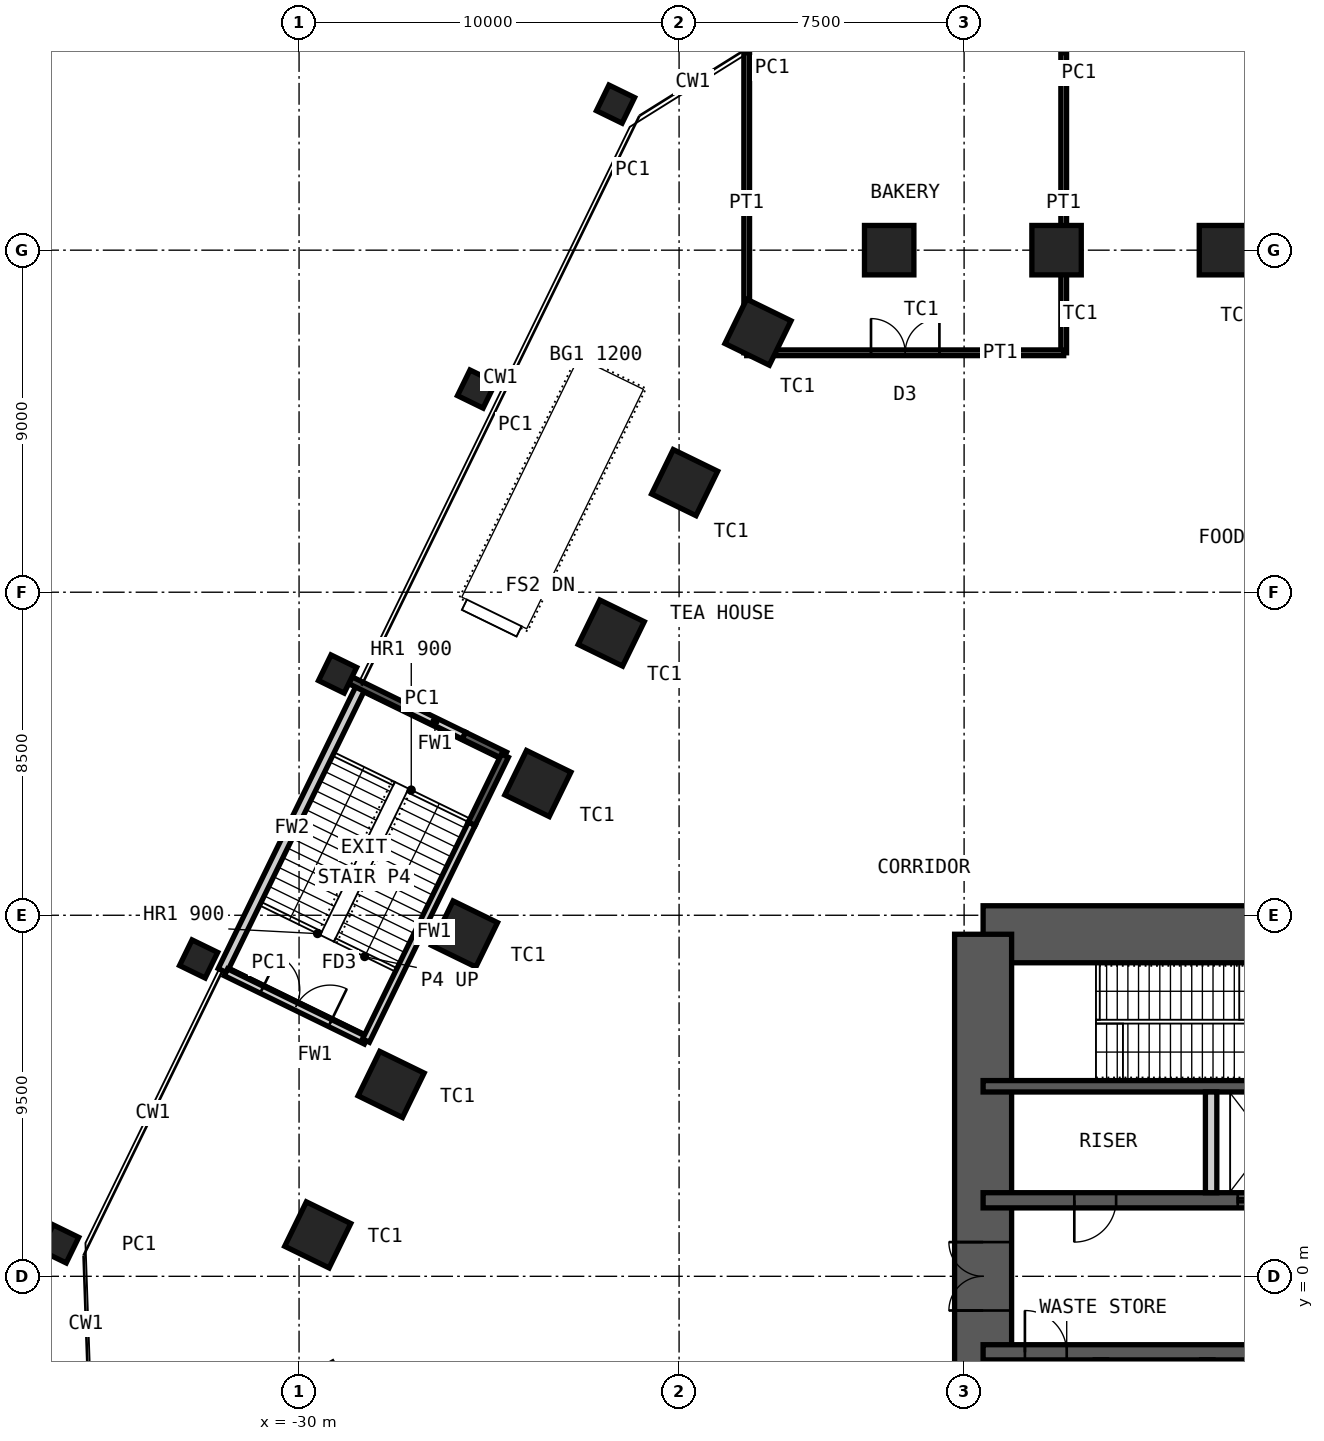
"""IFC4 building model, lengths in metres.
Left out: names, types, materials, properties, quantities, classifications, styles, units other than length and angle.
Written with IfcOpenShell. Run it as: python <this file> out.ifc"""

import sys

from ifc_helpers import new_model, si_unit, direction, frame, frame_2d, origin, origin_2d, place, context, subcontext, project, spatial, rectangle, hollow_rectangle, extrude, element, fill, save


model = new_model("IFC4")
c1 = context("Model", 3, precision=1e-05, world=origin(), true_north=direction((0.0, 1.0)))
c2 = subcontext(c1, "Body", "Model", "MODEL_VIEW")
j1 = project(units=[si_unit("LENGTHUNIT", "METRE"), si_unit("PLANEANGLEUNIT", "RADIAN")], contexts=[c1])
p1 = place(None, origin())
s1 = spatial("IfcSite", under=j1, at=p1, CompositionType="ELEMENT")
p2 = place(p1, origin())
s2 = spatial("IfcBuilding", under=s1, at=p2, CompositionType="ELEMENT")
p3 = place(p2, frame((0.0, 0.0, 6.0)))
s3 = spatial("IfcBuildingStorey", under=s2, at=p3, CompositionType="ELEMENT", Elevation=6.0)
for number, where, z_axis, x_axis in (
    (1, (-14.471, 27.0, 0.0), (0.0, 0.0, 1.0), (-1.0, 0.0, 0.0)),
    (2, (-10.067, 27.0, 0.0), (0.0, 0.0, 1.0), (-1.0, 0.0, 0.0)),
    (3, (-5.662, 27.0, 0.0), (0.0, 0.0, 1.0), (-1.0, 0.0, 0.0)),
    (4, (-29.509, 1.09, 0.0), (0.0, 0.0, 1.0), (-0.438, -0.899, 0.0)),
    (5, (-27.578, 5.049, 0.0), (0.0, 0.0, 1.0), (-0.438, -0.899, 0.0)),
    (6, (-25.647, 9.008, 0.0), (0.0, 0.0, 1.0), (-0.438, -0.899, 0.0)),
    (7, (-23.716, 12.966, 0.0), (0.0, 0.0, 1.0), (-0.438, -0.899, 0.0)),
    (8, (-21.785, 16.925, 0.0), (0.0, 0.0, 1.0), (-0.438, -0.899, 0.0)),
    (9, (-19.854, 20.884, 0.0), (0.0, 0.0, 1.0), (-0.438, -0.899, 0.0)),
    (10, (-17.924, 24.843, 0.0), (0.0, 0.0, 1.0), (-0.438, -0.899, 0.0)),
):
    element("IfcColumn", number, at=place(p3, frame(where, z_axis=z_axis, x_axis=x_axis)), inside=s3, PredefinedType="COLUMN", context=c2, shape_type="SweptSolid", body=[
        extrude(hollow_rectangle(XDim=1.3, YDim=1.3, WallThickness=0.1, at=origin_2d()), origin(), (0.0, 0.0, 1.0), 6.0),
    ])
for number, where, z_axis, x_axis in (
    (11, (-36.3, 0.853, 0.0), (0.0, 0.0, 1.0), (-0.438, -0.899, 0.0)),
    (12, (-32.643, 8.35, 0.0), (0.0, 0.0, 1.0), (-0.438, -0.899, 0.0)),
    (13, (-28.986, 15.848, 0.0), (0.0, 0.0, 1.0), (-0.438, -0.899, 0.0)),
    (14, (-25.33, 23.345, 0.0), (0.0, 0.0, 1.0), (-0.438, -0.899, 0.0)),
    (15, (-21.673, 30.843, 0.0), (0.0, 0.0, 1.0), (-0.438, -0.899, 0.0)),
):
    element("IfcColumn", number, at=place(p3, frame(where, z_axis=z_axis, x_axis=x_axis)), inside=s3, PredefinedType="COLUMN", context=c2, shape_type="SweptSolid", body=[
        extrude(hollow_rectangle(XDim=0.75, YDim=0.75, WallThickness=0.036, at=origin_2d()), origin(), (0.0, 0.0, 1.0), 6.0),
    ])
p4 = place(p3, frame((-12.0, 9.0, 0.0), z_axis=(0.0, 0.0, 1.0), x_axis=(1.0, 0.0, 0.0)))
e16 = element("IfcWall", 16, at=p4, inside=s3, PredefinedType="SHEAR", context=c2, shape_type="SweptSolid", body=[
    extrude(rectangle(XDim=24.0, YDim=1.5, at=frame_2d((12.0, 0.0))), origin(), (0.0, 0.0, 1.0), 6.0),
])
p5 = place(p4, frame((10.4, 0.0, 0.0)))
e17 = element("IfcOpeningElement", 17, at=p5, cuts=e16, PredefinedType="OPENING", context=c2, shape_type="SweptSolid", body=[
    extrude(rectangle(XDim=1.0, YDim=2.1, at=frame_2d((0.5, 1.05))), frame((0.0, 0.76, 0.0), z_axis=(0.0, -1.0, 0.0), x_axis=(1.0, 0.0, 0.0)), (0.0, 0.0, 1.0), 1.52),
])
p6 = place(p4, frame((17.6, 0.0, 0.0)))
e18 = element("IfcOpeningElement", 18, at=p6, cuts=e16, PredefinedType="OPENING", context=c2, shape_type="SweptSolid", body=[
    extrude(rectangle(XDim=0.9, YDim=2.1, at=frame_2d((0.45, 1.05))), frame((0.0, 0.76, 0.0), z_axis=(0.0, -1.0, 0.0), x_axis=(1.0, 0.0, 0.0)), (0.0, 0.0, 1.0), 1.52),
])
p7 = place(p4, frame((21.9, 0.0, 0.0)))
e19 = element("IfcOpeningElement", 19, at=p7, cuts=e16, PredefinedType="OPENING", context=c2, shape_type="SweptSolid", body=[
    extrude(rectangle(XDim=0.9, YDim=2.1, at=frame_2d((0.45, 1.05))), frame((0.0, 0.76, 0.0), z_axis=(0.0, -1.0, 0.0), x_axis=(1.0, 0.0, 0.0)), (0.0, 0.0, 1.0), 1.52),
])
p8 = place(p3, frame((-12.0, -9.0, 0.0), z_axis=(0.0, 0.0, 1.0), x_axis=(0.0, 1.0, 0.0)))
e20 = element("IfcWall", 20, at=p8, inside=s3, PredefinedType="SHEAR", context=c2, shape_type="SweptSolid", body=[
    extrude(rectangle(XDim=18.0, YDim=1.5, at=frame_2d((9.0, 0.0))), origin(), (0.0, 0.0, 1.0), 6.0),
])
p9 = place(p8, frame((8.1, 0.0, 0.0)))
e21 = element("IfcOpeningElement", 21, at=p9, cuts=e20, PredefinedType="OPENING", context=c2, shape_type="SweptSolid", body=[
    extrude(rectangle(XDim=1.8, YDim=2.1, at=frame_2d((0.9, 1.05))), frame((0.0, 0.76, 0.0), z_axis=(0.0, -1.0, 0.0), x_axis=(1.0, 0.0, 0.0)), (0.0, 0.0, 1.0), 1.52),
])
p10 = place(p3, frame((-12.0, 5.0, 0.0), z_axis=(0.0, 0.0, 1.0), x_axis=(1.0, 0.0, 0.0)))
e22 = element("IfcWall", 22, at=p10, inside=s3, PredefinedType="SHEAR", context=c2, shape_type="SweptSolid", body=[
    extrude(rectangle(XDim=24.0, YDim=0.3, at=frame_2d((12.0, 0.0))), origin(), (0.0, 0.0, 1.0), 6.0),
])
p11 = place(p3, frame((-12.0, 2.0, 0.0), z_axis=(0.0, 0.0, 1.0), x_axis=(1.0, 0.0, 0.0)))
e23 = element("IfcWall", 23, at=p11, inside=s3, PredefinedType="SHEAR", context=c2, shape_type="SweptSolid", body=[
    extrude(rectangle(XDim=24.0, YDim=0.4, at=frame_2d((12.0, 0.0))), origin(), (0.0, 0.0, 1.0), 6.0),
])
p12 = place(p11, frame((2.4, 0.0, 0.0)))
e24 = element("IfcOpeningElement", 24, at=p12, cuts=e23, PredefinedType="OPENING", context=c2, shape_type="SweptSolid", body=[
    extrude(rectangle(XDim=1.1, YDim=2.1, at=frame_2d((0.55, 1.05))), frame((0.0, 0.21, 0.0), z_axis=(0.0, -1.0, 0.0), x_axis=(1.0, 0.0, 0.0)), (0.0, 0.0, 1.0), 0.42),
])
p13 = place(p11, frame((22.0, 0.0, 0.0)))
e25 = element("IfcOpeningElement", 25, at=p13, cuts=e23, PredefinedType="OPENING", context=c2, shape_type="SweptSolid", body=[
    extrude(rectangle(XDim=1.1, YDim=2.1, at=frame_2d((0.55, 1.05))), frame((0.0, 0.21, 0.0), z_axis=(0.0, -1.0, 0.0), x_axis=(1.0, 0.0, 0.0)), (0.0, 0.0, 1.0), 0.42),
])
p14 = place(p11, frame((10.15, 0.0, 0.0)))
e26 = element("IfcOpeningElement", 26, at=p14, cuts=e23, PredefinedType="OPENING", context=c2, shape_type="SweptSolid", body=[
    extrude(rectangle(XDim=1.0, YDim=2.1, at=frame_2d((0.5, 1.05))), frame((0.0, 0.21, 0.0), z_axis=(0.0, -1.0, 0.0), x_axis=(1.0, 0.0, 0.0)), (0.0, 0.0, 1.0), 0.42),
])
p15 = place(p11, frame((6.7, 0.0, 0.0)))
e27 = element("IfcOpeningElement", 27, at=p15, cuts=e23, PredefinedType="OPENING", context=c2, shape_type="SweptSolid", body=[
    extrude(rectangle(XDim=1.4, YDim=2.4, at=frame_2d((0.7, 1.2))), frame((0.0, 0.21, 0.0), z_axis=(0.0, -1.0, 0.0), x_axis=(1.0, 0.0, 0.0)), (0.0, 0.0, 1.0), 0.42),
])
p16 = place(p11, frame((13.35, 0.0, 0.0)))
e28 = element("IfcOpeningElement", 28, at=p16, cuts=e23, PredefinedType="OPENING", context=c2, shape_type="SweptSolid", body=[
    extrude(rectangle(XDim=1.1, YDim=2.4, at=frame_2d((0.55, 1.2))), frame((0.0, 0.21, 0.0), z_axis=(0.0, -1.0, 0.0), x_axis=(1.0, 0.0, 0.0)), (0.0, 0.0, 1.0), 0.42),
])
p17 = place(p11, frame((16.15, 0.0, 0.0)))
e29 = element("IfcOpeningElement", 29, at=p17, cuts=e23, PredefinedType="OPENING", context=c2, shape_type="SweptSolid", body=[
    extrude(rectangle(XDim=1.1, YDim=2.4, at=frame_2d((0.55, 1.2))), frame((0.0, 0.21, 0.0), z_axis=(0.0, -1.0, 0.0), x_axis=(1.0, 0.0, 0.0)), (0.0, 0.0, 1.0), 0.42),
])
p18 = place(p11, frame((18.95, 0.0, 0.0)))
e30 = element("IfcOpeningElement", 30, at=p18, cuts=e23, PredefinedType="OPENING", context=c2, shape_type="SweptSolid", body=[
    extrude(rectangle(XDim=1.1, YDim=2.4, at=frame_2d((0.55, 1.2))), frame((0.0, 0.21, 0.0), z_axis=(0.0, -1.0, 0.0), x_axis=(1.0, 0.0, 0.0)), (0.0, 0.0, 1.0), 0.42),
])
p19 = place(p3, frame((-12.0, -2.0, 0.0), z_axis=(0.0, 0.0, 1.0), x_axis=(1.0, 0.0, 0.0)))
e31 = element("IfcWall", 31, at=p19, inside=s3, PredefinedType="SHEAR", context=c2, shape_type="SweptSolid", body=[
    extrude(rectangle(XDim=24.0, YDim=0.4, at=frame_2d((12.0, 0.0))), origin(), (0.0, 0.0, 1.0), 6.0),
])
p20 = place(p19, frame((1.1, 0.0, 0.0)))
e32 = element("IfcOpeningElement", 32, at=p20, cuts=e31, PredefinedType="OPENING", context=c2, shape_type="SweptSolid", body=[
    extrude(rectangle(XDim=1.1, YDim=2.1, at=frame_2d((0.55, 1.05))), frame((0.0, 0.21, 0.0), z_axis=(0.0, -1.0, 0.0), x_axis=(1.0, 0.0, 0.0)), (0.0, 0.0, 1.0), 0.42),
])
p21 = place(p19, frame((13.55, 0.0, 0.0)))
e33 = element("IfcOpeningElement", 33, at=p21, cuts=e31, PredefinedType="OPENING", context=c2, shape_type="SweptSolid", body=[
    extrude(rectangle(XDim=1.1, YDim=2.1, at=frame_2d((0.55, 1.05))), frame((0.0, 0.21, 0.0), z_axis=(0.0, -1.0, 0.0), x_axis=(1.0, 0.0, 0.0)), (0.0, 0.0, 1.0), 0.42),
])
p22 = place(p19, frame((20.7, 0.0, 0.0)))
e34 = element("IfcOpeningElement", 34, at=p22, cuts=e31, PredefinedType="OPENING", context=c2, shape_type="SweptSolid", body=[
    extrude(rectangle(XDim=1.1, YDim=2.1, at=frame_2d((0.55, 1.05))), frame((0.0, 0.21, 0.0), z_axis=(0.0, -1.0, 0.0), x_axis=(1.0, 0.0, 0.0)), (0.0, 0.0, 1.0), 0.42),
])
for number, where, z_axis, x_axis in (
    (35, (-6.0, 2.2, 0.0), (0.0, 0.0, 1.0), (0.0, 1.0, 0.0)),
    (36, (-8.9, -4.85, 0.0), (0.0, 0.0, 1.0), (0.0, 1.0, 0.0)),
    (37, (-6.1, -4.85, 0.0), (0.0, 0.0, 1.0), (0.0, 1.0, 0.0)),
):
    element("IfcWall", number, at=place(p3, frame(where, z_axis=z_axis, x_axis=x_axis)), inside=s3, PredefinedType="PARTITIONING", context=c2, shape_type="SweptSolid", body=[
        extrude(rectangle(XDim=2.65, YDim=0.3, at=frame_2d((1.325, 0.0))), origin(), (0.0, 0.0, 1.0), 5.78),
    ])
p23 = place(p3, frame((-32.014, 8.043, 0.0), z_axis=(0.0, 0.0, 1.0), x_axis=(0.438364815309, 0.898797134341, 0.0)))
e38 = element("IfcWall", 38, at=p23, inside=s3, PredefinedType="SOLIDWALL", context=c2, shape_type="SweptSolid", body=[
    extrude(rectangle(XDim=8.342, YDim=0.25, at=frame_2d((4.171, 0.0))), origin(), (0.0, 0.0, 1.0), 5.75),
])
for number, where, z_axis, x_axis in (
    (39, (-18.221, 32.2, 0.0), (0.0, 0.0, 1.0), (0.0, -1.0, 0.0)),
    (40, (-9.879, 32.2, 0.0), (0.0, 0.0, 1.0), (0.0, -1.0, 0.0)),
):
    element("IfcWall", number, at=place(p3, frame(where, z_axis=z_axis, x_axis=x_axis)), inside=s3, PredefinedType="PARTITIONING", context=c2, shape_type="SweptSolid", body=[
        extrude(rectangle(XDim=7.9, YDim=0.15, at=frame_2d((3.95, 0.0))), origin(), (0.0, 0.0, 1.0), 5.75),
    ])
p24 = place(p3, frame((-18.221, 24.3, 0.0), z_axis=(0.0, 0.0, 1.0), x_axis=(1.0, 0.0, 0.0)))
e41 = element("IfcWall", 41, at=p24, inside=s3, PredefinedType="PARTITIONING", context=c2, shape_type="SweptSolid", body=[
    extrude(rectangle(XDim=8.342, YDim=0.15, at=frame_2d((4.171, 0.0))), origin(), (0.0, 0.0, 1.0), 5.75),
])
p25 = place(p24, frame((3.271, 0.0, 0.0)))
e42 = element("IfcOpeningElement", 42, at=p25, cuts=e41, PredefinedType="OPENING", context=c2, shape_type="SweptSolid", body=[
    extrude(rectangle(XDim=1.8, YDim=2.4, at=frame_2d((0.9, 1.2))), frame((0.0, 0.085, 0.0), z_axis=(0.0, -1.0, 0.0), x_axis=(1.0, 0.0, 0.0)), (0.0, 0.0, 1.0), 0.17),
])
p26 = place(p3, frame((-31.924, 8.0, 0.0), z_axis=(0.0, 0.0, 1.0), x_axis=(0.898790191345, -0.438379050529, 0.0)))
e43 = element("IfcWall", 43, at=p26, inside=s3, PredefinedType="PARTITIONING", context=c2, shape_type="SweptSolid", body=[
    extrude(rectangle(XDim=4.1, YDim=0.2, at=frame_2d((2.05, 0.0))), origin(), (0.0, 0.0, 1.0), 5.75),
])
p27 = place(p26, frame((1.05, 0.0, 0.0)))
e44 = element("IfcOpeningElement", 44, at=p27, cuts=e43, PredefinedType="OPENING", context=c2, shape_type="SweptSolid", body=[
    extrude(rectangle(XDim=2.0, YDim=2.4, at=frame_2d((1.0, 1.2))), frame((0.0, 0.11, 0.0), z_axis=(0.0, -1.0, 0.0), x_axis=(1.0, 0.0, 0.0)), (0.0, 0.0, 1.0), 0.22),
])
p28 = place(p3, frame((-28.649, 15.683, 0.0), z_axis=(0.0, 0.0, 1.0), x_axis=(0.898859390649, -0.438237145667, 0.0)))
e45 = element("IfcWall", 45, at=p28, inside=s3, PredefinedType="PARTITIONING", context=c2, shape_type="SweptSolid", body=[
    extrude(rectangle(XDim=1.625, YDim=0.2, at=frame_2d((0.812, 0.0))), origin(), (0.0, 0.0, 1.0), 5.75),
])
p29 = place(p3, frame((-28.239, 6.202, 0.0), z_axis=(0.0, 0.0, 1.0), x_axis=(0.438364548315, 0.89879726456, 0.0)))
e46 = element("IfcWall", 46, at=p29, inside=s3, PredefinedType="PARTITIONING", context=c2, shape_type="SweptSolid", body=[
    extrude(rectangle(XDim=6.35, YDim=0.2, at=frame_2d((3.175, 0.0))), origin(), (0.0, 0.0, 1.0), 5.75),
])
p30 = place(p3, frame((-27.189, 14.971, 0.0), z_axis=(0.0, 0.0, 1.0), x_axis=(0.898750501486, -0.438460415634, 0.0)))
e47 = element("IfcWall", 47, at=p30, inside=s3, PredefinedType="PARTITIONING", context=c2, shape_type="SweptSolid", body=[
    extrude(rectangle(XDim=1.7, YDim=0.2, at=frame_2d((0.85, 0.0))), origin(), (0.0, 0.0, 1.0), 5.75),
])
p31 = place(p3, frame((-25.661, 14.226, 0.0), z_axis=(0.0, 0.0, 1.0), x_axis=(0.898778221275, -0.43840359141, 0.0)))
e48 = element("IfcWall", 48, at=p31, inside=s3, PredefinedType="PARTITIONING", context=c2, shape_type="SweptSolid", body=[
    extrude(rectangle(XDim=1.2, YDim=0.2, at=frame_2d((0.6, 0.0))), origin(), (0.0, 0.0, 1.0), 5.75),
])
p32 = place(p3, frame((-25.455, 11.91, 0.0), z_axis=(0.0, 0.0, 1.0), x_axis=(0.438365666617, 0.898796719137, 0.0)))
e49 = element("IfcWall", 49, at=p32, inside=s3, PredefinedType="PARTITIONING", context=c2, shape_type="SweptSolid", body=[
    extrude(rectangle(XDim=1.992, YDim=0.2, at=frame_2d((0.996, 0.0))), origin(), (0.0, 0.0, 1.0), 5.75),
])
p33 = place(p12, origin())
e50 = element("IfcDoor", 50, at=p33, inside=s3, OperationType="SINGLE_SWING_LEFT", PredefinedType="DOOR", context=c2, shape_type="SweptSolid", body=[
    extrude(rectangle(XDim=1.1, YDim=2.1, at=frame_2d((0.55, 1.05))), frame((0.0, 0.025, 0.0), z_axis=(0.0, -1.0, 0.0), x_axis=(1.0, 0.0, 0.0)), (0.0, 0.0, 1.0), 0.05),
])
fill(e24, e50)
p34 = place(p20, origin())
e51 = element("IfcDoor", 51, at=p34, inside=s3, OperationType="SINGLE_SWING_RIGHT", PredefinedType="DOOR", context=c2, shape_type="SweptSolid", body=[
    extrude(rectangle(XDim=1.1, YDim=2.1, at=frame_2d((0.55, 1.05))), frame((0.0, 0.025, 0.0), z_axis=(0.0, -1.0, 0.0), x_axis=(1.0, 0.0, 0.0)), (0.0, 0.0, 1.0), 0.05),
])
fill(e32, e51)
p35 = place(p9, origin())
e52 = element("IfcDoor", 52, at=p35, inside=s3, OperationType="DOUBLE_DOOR_DOUBLE_SWING", PredefinedType="DOOR", context=c2, shape_type="SweptSolid", body=[
    extrude(rectangle(XDim=1.8, YDim=2.1, at=frame_2d((0.9, 1.05))), frame((0.0, 0.025, 0.0), z_axis=(0.0, -1.0, 0.0), x_axis=(1.0, 0.0, 0.0)), (0.0, 0.0, 1.0), 0.05),
])
fill(e21, e52)
p36 = place(p15, origin())
e53 = element("IfcDoor", 53, at=p36, inside=s3, OperationType="DOUBLE_DOOR_SLIDING", PredefinedType="DOOR", context=c2, shape_type="SweptSolid", body=[
    extrude(rectangle(XDim=1.4, YDim=2.4, at=frame_2d((0.7, 1.2))), frame((0.0, 0.025, 0.0), z_axis=(0.0, -1.0, 0.0), x_axis=(1.0, 0.0, 0.0)), (0.0, 0.0, 1.0), 0.05),
])
fill(e27, e53)
p37 = place(p25, origin())
e54 = element("IfcDoor", 54, at=p37, inside=s3, OperationType="DOUBLE_DOOR_DOUBLE_SWING", PredefinedType="DOOR", context=c2, shape_type="SweptSolid", body=[
    extrude(rectangle(XDim=1.8, YDim=2.4, at=frame_2d((0.9, 1.2))), frame((0.0, 0.025, 0.0), z_axis=(0.0, -1.0, 0.0), x_axis=(1.0, 0.0, 0.0)), (0.0, 0.0, 1.0), 0.05),
])
fill(e42, e54)
p38 = place(p27, origin())
e55 = element("IfcDoor", 55, at=p38, inside=s3, OperationType="DOUBLE_DOOR_DOUBLE_SWING", PredefinedType="DOOR", context=c2, shape_type="SweptSolid", body=[
    extrude(rectangle(XDim=2.0, YDim=2.4, at=frame_2d((1.0, 1.2))), frame((0.0, 0.025, 0.0), z_axis=(0.0, -1.0, 0.0), x_axis=(1.0, 0.0, 0.0)), (0.0, 0.0, 1.0), 0.05),
])
fill(e44, e55)
save(model, sys.argv[1])
